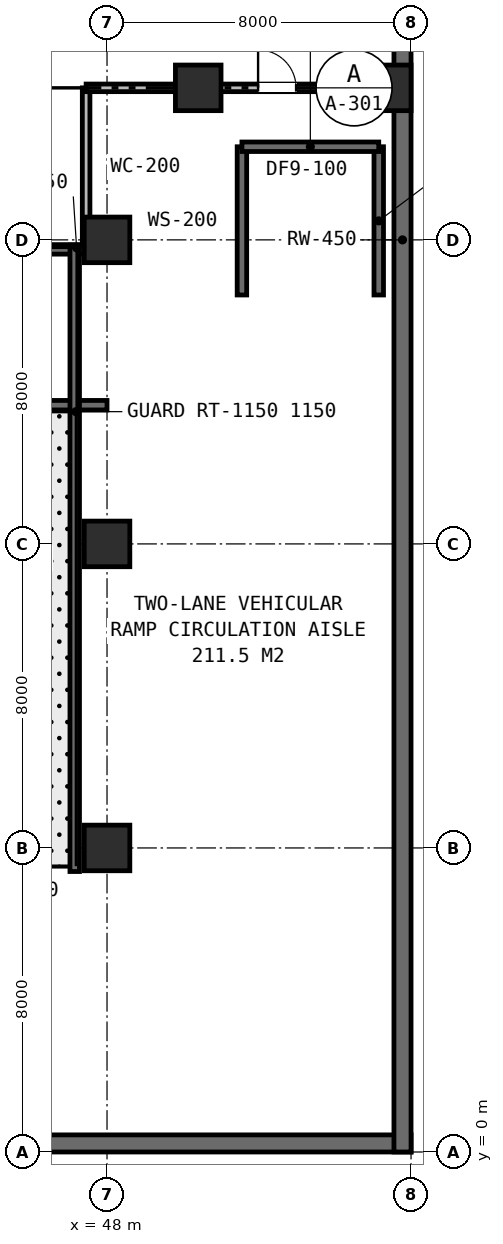
"""IFC4 building model, lengths in metres.
Left out: names, types, materials, properties, quantities, classifications, styles, units other than length and angle.
Written with IfcOpenShell. Run it as: python <this file> out.ifc"""

import sys

from ifc_helpers import new_model, si_unit, direction, frame, frame_2d, origin, origin_2d, place, context, subcontext, project, spatial, rectangle, extrude, element, fill, save


model = new_model("IFC4")
c1 = context("Model", 3, precision=1e-05, world=origin(), true_north=direction((0.0, 1.0)))
c2 = subcontext(c1, "Body", "Model", "MODEL_VIEW")
j1 = project(units=[si_unit("LENGTHUNIT", "METRE"), si_unit("PLANEANGLEUNIT", "RADIAN")], contexts=[c1])
p1 = place(None, origin())
s1 = spatial("IfcSite", under=j1, at=p1, CompositionType="ELEMENT")
p2 = place(p1, origin())
s2 = spatial("IfcBuilding", under=s1, at=p2, CompositionType="ELEMENT")
p3 = place(p2, frame((0.0, 0.0, -13.2)))
s3 = spatial("IfcBuildingStorey", under=s2, at=p3, CompositionType="ELEMENT", Elevation=-13.2)
p4 = place(p3, frame((0.0, 0.225, 0.0), z_axis=(0.0, 0.0, 1.0), x_axis=(1.0, 0.0, 0.0)))
e1 = element("IfcWall", 1, at=p4, inside=s3, PredefinedType="USERDEFINED", context=c2, shape_type="SweptSolid", body=[
    extrude(rectangle(XDim=56.0, YDim=0.45, at=frame_2d((28.0, 0.0))), origin(), (0.0, 0.0, 1.0), 3.8),
])
p5 = place(p3, frame((55.775, 0.0, 0.0), z_axis=(0.0, 0.0, 1.0), x_axis=(0.0, 1.0, 0.0)))
e2 = element("IfcWall", 2, at=p5, inside=s3, PredefinedType="USERDEFINED", context=c2, shape_type="SweptSolid", body=[
    extrude(rectangle(XDim=48.0, YDim=0.45, at=frame_2d((24.0, 0.0))), origin(), (0.0, 0.0, 1.0), 3.8),
])
for number, where, z_axis, x_axis in (
    (3, (50.4, 28.0, 0.0), (0.0, 0.0, 1.0), (1.0, 0.0, 0.0)),
    (4, (55.4, 28.0, 0.0), (0.0, 0.0, 1.0), (1.0, 0.0, 0.0)),
    (5, (48.0, 8.0, 0.0), (0.0, 0.0, 1.0), (1.0, 0.0, 0.0)),
    (6, (48.0, 16.0, 0.0), (0.0, 0.0, 1.0), (1.0, 0.0, 0.0)),
    (7, (48.0, 24.0, 0.0), (0.0, 0.0, 1.0), (1.0, 0.0, 0.0)),
):
    element("IfcColumn", number, at=place(p3, frame(where, z_axis=z_axis, x_axis=x_axis)), inside=s3, PredefinedType="COLUMN", context=c2, shape_type="SweptSolid", body=[
        extrude(rectangle(XDim=1.2, YDim=1.2, at=origin_2d()), origin(), (0.0, 0.0, 1.0), 3.8),
    ])
p6 = place(p3, frame((47.45, 23.85, 0.0), z_axis=(0.0, 0.0, 1.0), x_axis=(0.0, 1.0, 0.0)))
e8 = element("IfcWall", 8, at=p6, inside=s3, PredefinedType="PARTITIONING", context=c2, shape_type="SweptSolid", body=[
    extrude(rectangle(XDim=4.15, YDim=0.2, at=frame_2d((2.075, 0.0))), origin(), (0.0, 0.0, 1.0), 2.88),
])
p7 = place(p3, frame((47.45, 28.0, 0.0), z_axis=(0.0, 0.0, 1.0), x_axis=(1.0, 0.0, 0.0)))
e9 = element("IfcWall", 9, at=p7, inside=s3, PredefinedType="PARTITIONING", context=c2, shape_type="SweptSolid", body=[
    extrude(rectangle(XDim=8.0, YDim=0.2, at=frame_2d((4.0, 0.0))), origin(), (0.0, 0.0, 1.0), 2.88),
])
p8 = place(p7, frame((4.525, 0.0, 0.0)))
e10 = element("IfcOpeningElement", 10, at=p8, cuts=e9, PredefinedType="OPENING", context=c2, shape_type="SweptSolid", body=[
    extrude(rectangle(XDim=1.0, YDim=2.15, at=frame_2d((0.5, 1.075))), frame((0.0, 0.11, 0.0), z_axis=(0.0, -1.0, 0.0), x_axis=(1.0, 0.0, 0.0)), (0.0, 0.0, 1.0), 0.22),
])
p9 = place(p3, frame((40.0, 23.75, 0.0), z_axis=(0.0, 0.0, 1.0), x_axis=(1.0, 0.0, 0.0)))
e11 = element("IfcWall", 11, at=p9, inside=s3, PredefinedType="STANDARD", context=c2, shape_type="SweptSolid", body=[
    extrude(rectangle(XDim=8.0, YDim=0.25, at=frame_2d((4.0, 0.0))), origin(), (0.0, 0.0, 1.0), 3.5),
])
p10 = place(p3, frame((40.0, 19.65, 0.0), z_axis=(0.0, 0.0, 1.0), x_axis=(1.0, 0.0, 0.0)))
e12 = element("IfcWall", 12, at=p10, inside=s3, PredefinedType="STANDARD", context=c2, shape_type="SweptSolid", body=[
    extrude(rectangle(XDim=8.0, YDim=0.25, at=frame_2d((4.0, 0.0))), origin(), (0.0, 0.0, 1.0), 1.57),
])
p11 = place(p3, frame((47.15, 7.38, 0.0), z_axis=(0.0, 0.0, 1.0), x_axis=(0.0, 1.0, 0.0)))
e13 = element("IfcWall", 13, at=p11, inside=s3, PredefinedType="STANDARD", context=c2, shape_type="SweptSolid", body=[
    extrude(rectangle(XDim=16.48, YDim=0.25, at=frame_2d((8.24, 0.0))), origin(), (0.0, 0.0, 1.0), 3.5),
])
for number, where, z_axis, x_axis in (
    (14, (51.55, 22.55, 0.0), (0.0, 0.0, 1.0), (0.0, 1.0, 0.0)),
    (15, (55.15, 22.55, 0.0), (0.0, 0.0, 1.0), (0.0, 1.0, 0.0)),
):
    element("IfcWall", number, at=place(p3, frame(where, z_axis=z_axis, x_axis=x_axis)), inside=s3, PredefinedType="STANDARD", context=c2, shape_type="SweptSolid", body=[
        extrude(rectangle(XDim=3.9, YDim=0.25, at=frame_2d((1.95, 0.0))), origin(), (0.0, 0.0, 1.0), 3.8),
    ])
p12 = place(p3, frame((51.55, 26.45, 0.0), z_axis=(0.0, 0.0, 1.0), x_axis=(1.0, 0.0, 0.0)))
e16 = element("IfcWall", 16, at=p12, inside=s3, PredefinedType="STANDARD", context=c2, shape_type="SweptSolid", body=[
    extrude(rectangle(XDim=3.6, YDim=0.25, at=frame_2d((1.8, 0.0))), origin(), (0.0, 0.0, 1.0), 3.8),
])
p13 = place(p8, origin())
e17 = element("IfcDoor", 17, at=p13, inside=s3, OperationType="SINGLE_SWING_LEFT", PredefinedType="DOOR", context=c2, shape_type="SweptSolid", body=[
    extrude(rectangle(XDim=1.0, YDim=2.15, at=frame_2d((0.5, 1.075))), frame((0.0, 0.025, 0.0), z_axis=(0.0, -1.0, 0.0), x_axis=(1.0, 0.0, 0.0)), (0.0, 0.0, 1.0), 0.05),
])
fill(e10, e17)
save(model, sys.argv[1])
